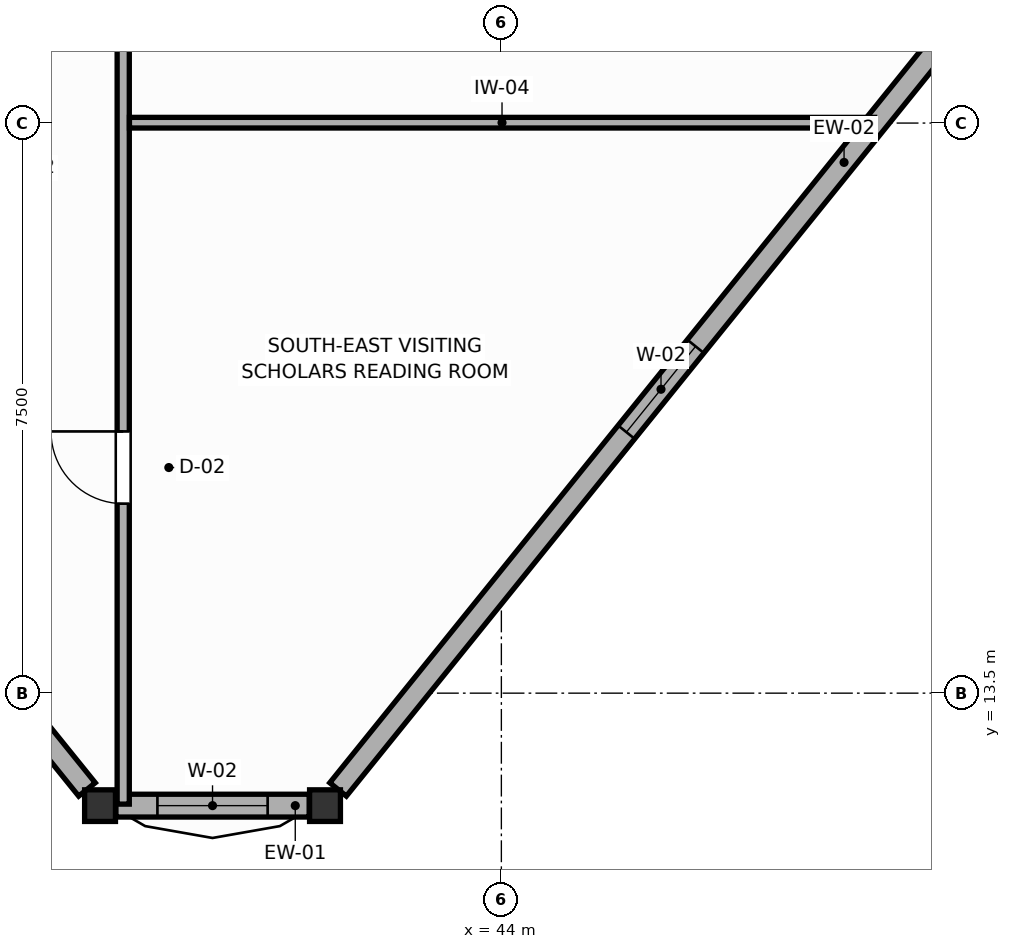
"""IFC4 building model, lengths in metres.
Left out: names, types, materials, properties, quantities, classifications, styles, units other than length and angle.
Written with IfcOpenShell. Run it as: python <this file> out.ifc"""

import sys

from ifc_helpers import new_model, si_unit, direction, frame, frame_2d, origin, origin_2d, place, context, subcontext, project, spatial, rectangle, i_section, extrude, source, transform, mapped, element, fill, save


model = new_model("IFC4")
c1 = context("Model", 3, precision=1e-05, world=origin(), true_north=direction((0.0, 1.0)))
c2 = subcontext(c1, "Body", "Model", "MODEL_VIEW")
j1 = project(units=[si_unit("LENGTHUNIT", "METRE"), si_unit("PLANEANGLEUNIT", "RADIAN")], contexts=[c1])
p1 = place(None, origin())
s1 = spatial("IfcSite", under=j1, at=p1, CompositionType="ELEMENT")
p2 = place(p1, origin())
s2 = spatial("IfcBuilding", under=s1, at=p2, CompositionType="ELEMENT")
p3 = place(p2, frame((0.0, 0.0, 216.6)))
s3 = spatial("IfcBuildingStorey", under=s2, at=p3, CompositionType="ELEMENT", Elevation=216.6)
m1 = source(origin(), c2, "Body", "SweptSolid", [
    extrude(i_section(OverallWidth=0.406, OverallDepth=0.416, WebThickness=0.027, FlangeThickness=0.044, FilletRadius=0.015, at=origin_2d()), origin(), (0.0, 0.0, 1.0), 3.6),
])
for number, where, z_axis, x_axis in (
    (1, (38.72, 12.02, 0.0), (0.0, 0.0, 1.0), (1.0, 0.0, 0.0)),
    (2, (41.68, 12.02, 0.0), (0.0, 0.0, 1.0), (1.0, 0.0, 0.0)),
):
    element("IfcColumn", number, at=place(p3, frame(where, z_axis=z_axis, x_axis=x_axis)), inside=s3, PredefinedType="COLUMN", context=c2, shape_type="MappedRepresentation", body=[
        mapped(m1, transform((0.0, 0.0, 0.0), scale=1.0)),
    ])
p4 = place(p3, frame((30.051, 22.763, 0.0), z_axis=(0.0, 0.0, 1.0), x_axis=(0.627990128971, -0.778221303946, 0.0)))
e3 = element("IfcWall", 3, at=p4, inside=s3, PredefinedType="SOLIDWALL", context=c2, shape_type="SweptSolid", body=[
    extrude(rectangle(XDim=13.531, YDim=0.28, at=frame_2d((6.765, 0.0))), origin(), (0.0, 0.0, 1.0), 2.96),
])
p5 = place(p4, frame((6.04, 0.0, 0.75)))
e4 = element("IfcOpeningElement", 4, at=p5, cuts=e3, PredefinedType="OPENING", context=c2, shape_type="SweptSolid", body=[
    extrude(rectangle(XDim=1.45, YDim=1.65, at=frame_2d((0.725, 0.825))), frame((0.0, 0.15, 0.0), z_axis=(0.0, -1.0, 0.0), x_axis=(1.0, 0.0, 0.0)), (0.0, 0.0, 1.0), 0.3),
])
p6 = place(p3, frame((38.928, 12.02, 0.0), z_axis=(0.0, 0.0, 1.0), x_axis=(1.0, 0.0, 0.0)))
e5 = element("IfcWall", 5, at=p6, inside=s3, PredefinedType="SOLIDWALL", context=c2, shape_type="SweptSolid", body=[
    extrude(rectangle(XDim=2.543, YDim=0.3, at=frame_2d((1.272, 0.0))), origin(), (0.0, 0.0, 1.0), 3.02),
])
p7 = place(p6, frame((0.547, 0.0, 0.75)))
e6 = element("IfcOpeningElement", 6, at=p7, cuts=e5, PredefinedType="OPENING", context=c2, shape_type="SweptSolid", body=[
    extrude(rectangle(XDim=1.45, YDim=1.65, at=frame_2d((0.725, 0.825))), frame((0.0, 0.16, 0.0), z_axis=(0.0, -1.0, 0.0), x_axis=(1.0, 0.0, 0.0)), (0.0, 0.0, 1.0), 0.32),
])
p8 = place(p3, frame((41.852, 12.233, 0.0), z_axis=(0.0, 0.0, 1.0), x_axis=(0.627979201057, 0.778230122162, 0.0)))
e7 = element("IfcWall", 7, at=p8, inside=s3, PredefinedType="SOLIDWALL", context=c2, shape_type="SweptSolid", body=[
    extrude(rectangle(XDim=13.531, YDim=0.28, at=frame_2d((6.765, 0.0))), origin(), (0.0, 0.0, 1.0), 2.96),
])
p9 = place(p8, frame((6.04, 0.0, 0.75)))
e8 = element("IfcOpeningElement", 8, at=p9, cuts=e7, PredefinedType="OPENING", context=c2, shape_type="SweptSolid", body=[
    extrude(rectangle(XDim=1.45, YDim=1.65, at=frame_2d((0.725, 0.825))), frame((0.0, 0.15, 0.0), z_axis=(0.0, -1.0, 0.0), x_axis=(1.0, 0.0, 0.0)), (0.0, 0.0, 1.0), 0.3),
])
p10 = place(p3, frame((39.025, 12.04, 0.0), z_axis=(0.0, 0.0, 1.0), x_axis=(0.0, 1.0, 0.0)))
e9 = element("IfcWall", 9, at=p10, inside=s3, PredefinedType="PARTITIONING", context=c2, shape_type="SweptSolid", body=[
    extrude(rectangle(XDim=17.99, YDim=0.16, at=frame_2d((8.995, 0.0))), origin(), (0.0, 0.0, 1.0), 3.41),
])
p11 = place(p10, frame((3.953, 0.0, 0.0)))
e10 = element("IfcOpeningElement", 10, at=p11, cuts=e9, PredefinedType="OPENING", context=c2, shape_type="SweptSolid", body=[
    extrude(rectangle(XDim=0.95, YDim=2.05, at=frame_2d((0.475, 1.025))), frame((0.0, 0.09, 0.0), z_axis=(0.0, -1.0, 0.0), x_axis=(1.0, 0.0, 0.0)), (0.0, 0.0, 1.0), 0.18),
])
p12 = place(p3, frame((39.107, 21.005, 0.0), z_axis=(0.0, 0.0, 1.0), x_axis=(1.0, 0.0, 0.0)))
e11 = element("IfcWall", 11, at=p12, inside=s3, PredefinedType="PARTITIONING", context=c2, shape_type="SweptSolid", body=[
    extrude(rectangle(XDim=9.803, YDim=0.14, at=frame_2d((4.902, 0.0))), origin(), (0.0, 0.0, 1.0), 3.41),
])
p13 = place(p7, origin())
e12 = element("IfcWindow", 12, at=p13, inside=s3, PartitioningType="SINGLE_PANEL", PredefinedType="WINDOW", context=c2, shape_type="SweptSolid", body=[
    extrude(rectangle(XDim=1.45, YDim=1.65, at=frame_2d((0.725, 0.825))), frame((0.0, 0.03, 0.0), z_axis=(0.0, -1.0, 0.0), x_axis=(1.0, 0.0, 0.0)), (0.0, 0.0, 1.0), 0.06),
])
fill(e6, e12)
p14 = place(p9, origin())
e13 = element("IfcWindow", 13, at=p14, inside=s3, PartitioningType="SINGLE_PANEL", PredefinedType="WINDOW", context=c2, shape_type="SweptSolid", body=[
    extrude(rectangle(XDim=1.45, YDim=1.65, at=frame_2d((0.725, 0.825))), frame((0.0, 0.03, 0.0), z_axis=(0.0, -1.0, 0.0), x_axis=(1.0, 0.0, 0.0)), (0.0, 0.0, 1.0), 0.06),
])
fill(e8, e13)
p15 = place(p11, origin())
e14 = element("IfcDoor", 14, at=p15, inside=s3, OperationType="SINGLE_SWING_RIGHT", PredefinedType="DOOR", context=c2, shape_type="SweptSolid", body=[
    extrude(rectangle(XDim=0.95, YDim=2.05, at=frame_2d((0.475, 1.025))), frame((0.0, 0.025, 0.0), z_axis=(0.0, -1.0, 0.0), x_axis=(1.0, 0.0, 0.0)), (0.0, 0.0, 1.0), 0.05),
])
fill(e10, e14)
save(model, sys.argv[1])
